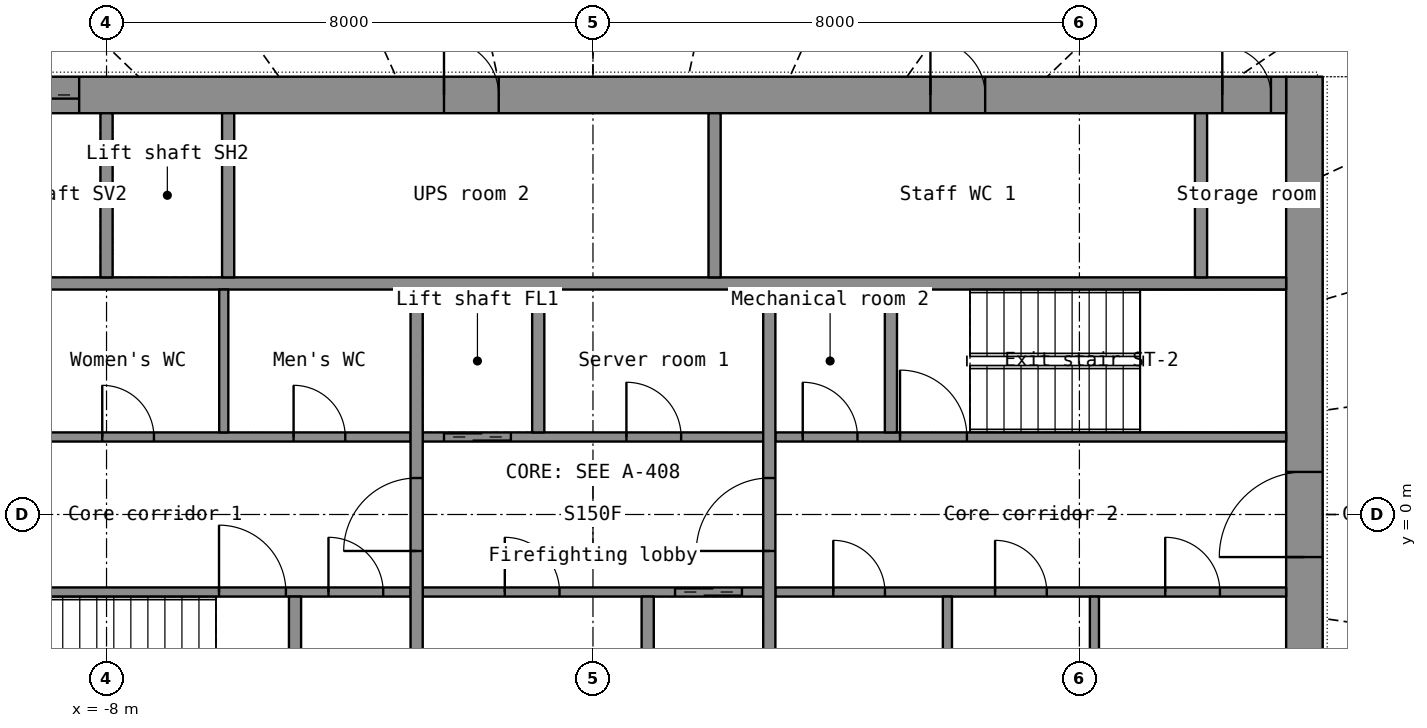
"""IFC4 building model, lengths in metres.
Left out: names, types, materials, properties, quantities, classifications, styles, units other than length and angle.
Written with IfcOpenShell. Run it as: python <this file> out.ifc"""

import sys

from ifc_helpers import new_model, si_unit, direction, frame, frame_2d, origin, place, context, subcontext, project, spatial, rectangle, extrude, element, fill, save


model = new_model("IFC4")
c1 = context("Model", 3, precision=1e-05, world=origin(), true_north=direction((0.0, 1.0)))
c2 = subcontext(c1, "Body", "Model", "MODEL_VIEW")
j1 = project(units=[si_unit("LENGTHUNIT", "METRE"), si_unit("PLANEANGLEUNIT", "RADIAN")], contexts=[c1])
p1 = place(None, origin())
s1 = spatial("IfcSite", under=j1, at=p1, CompositionType="ELEMENT")
p2 = place(p1, origin())
s2 = spatial("IfcBuilding", under=s1, at=p2, CompositionType="ELEMENT")
p3 = place(p2, frame((0.0, 0.0, 44.5)))
s3 = spatial("IfcBuildingStorey", under=s2, at=p3, CompositionType="ELEMENT", Elevation=44.5)
p4 = place(p3, frame((11.7, -7.2, 0.0), z_axis=(0.0, 0.0, 1.0), x_axis=(0.0, 1.0, 0.0)))
e1 = element("IfcWall", 1, at=p4, inside=s3, PredefinedType="SHEAR", context=c2, shape_type="SweptSolid", body=[
    extrude(rectangle(XDim=14.4, YDim=0.6, at=frame_2d((7.2, 0.0))), origin(), (0.0, 0.0, 1.0), 3.3),
])
p5 = place(p4, frame((6.5, 0.0, 0.0)))
e2 = element("IfcOpeningElement", 2, at=p5, cuts=e1, PredefinedType="OPENING", context=c2, shape_type="SweptSolid", body=[
    extrude(rectangle(XDim=1.4, YDim=2.2, at=frame_2d((0.7, 1.1))), frame((0.0, 0.31, 0.0), z_axis=(0.0, -1.0, 0.0), x_axis=(1.0, 0.0, 0.0)), (0.0, 0.0, 1.0), 0.62),
])
p6 = place(p3, frame((-11.4, 6.9, 0.0), z_axis=(0.0, 0.0, 1.0), x_axis=(1.0, 0.0, 0.0)))
e3 = element("IfcWall", 3, at=p6, inside=s3, PredefinedType="SHEAR", context=c2, shape_type="SweptSolid", body=[
    extrude(rectangle(XDim=22.8, YDim=0.6, at=frame_2d((11.4, 0.0))), origin(), (0.0, 0.0, 1.0), 3.3),
])
p7 = place(p6, frame((1.85, 0.0, 0.0)))
e4 = element("IfcOpeningElement", 4, at=p7, cuts=e3, PredefinedType="OPENING", context=c2, shape_type="SweptSolid", body=[
    extrude(rectangle(XDim=1.1, YDim=2.2, at=frame_2d((0.55, 1.1))), frame((0.0, 0.31, 0.0), z_axis=(0.0, -1.0, 0.0), x_axis=(1.0, 0.0, 0.0)), (0.0, 0.0, 1.0), 0.62),
])
p8 = place(p6, frame((8.95, 0.0, 0.0)))
e5 = element("IfcOpeningElement", 5, at=p8, cuts=e3, PredefinedType="OPENING", context=c2, shape_type="SweptSolid", body=[
    extrude(rectangle(XDim=0.9, YDim=2.1, at=frame_2d((0.45, 1.05))), frame((0.0, 0.31, 0.0), z_axis=(0.0, -1.0, 0.0), x_axis=(1.0, 0.0, 0.0)), (0.0, 0.0, 1.0), 0.62),
])
p9 = place(p6, frame((16.95, 0.0, 0.0)))
e6 = element("IfcOpeningElement", 6, at=p9, cuts=e3, PredefinedType="OPENING", context=c2, shape_type="SweptSolid", body=[
    extrude(rectangle(XDim=0.9, YDim=2.1, at=frame_2d((0.45, 1.05))), frame((0.0, 0.31, 0.0), z_axis=(0.0, -1.0, 0.0), x_axis=(1.0, 0.0, 0.0)), (0.0, 0.0, 1.0), 0.62),
])
p10 = place(p6, frame((0.25, 0.0, 0.0)))
e7 = element("IfcOpeningElement", 7, at=p10, cuts=e3, PredefinedType="OPENING", context=c2, shape_type="SweptSolid", body=[
    extrude(rectangle(XDim=0.8, YDim=2.05, at=frame_2d((0.4, 1.025))), frame((0.0, 0.31, 0.0), z_axis=(0.0, -1.0, 0.0), x_axis=(1.0, 0.0, 0.0)), (0.0, 0.0, 1.0), 0.62),
])
p11 = place(p6, frame((21.75, 0.0, 0.0)))
e8 = element("IfcOpeningElement", 8, at=p11, cuts=e3, PredefinedType="OPENING", context=c2, shape_type="SweptSolid", body=[
    extrude(rectangle(XDim=0.8, YDim=2.05, at=frame_2d((0.4, 1.025))), frame((0.0, 0.31, 0.0), z_axis=(0.0, -1.0, 0.0), x_axis=(1.0, 0.0, 0.0)), (0.0, 0.0, 1.0), 0.62),
])
p12 = place(p3, frame((-11.4, 3.8, 0.0), z_axis=(0.0, 0.0, 1.0), x_axis=(1.0, 0.0, 0.0)))
e9 = element("IfcWall", 9, at=p12, inside=s3, PredefinedType="SHEAR", context=c2, shape_type="SweptSolid", body=[
    extrude(rectangle(XDim=22.8, YDim=0.2, at=frame_2d((11.4, 0.0))), origin(), (0.0, 0.0, 1.0), 3.3),
])
for number, where, z_axis, x_axis in (
    (10, (-8.0, 3.9, 0.0), (0.0, 0.0, 1.0), (0.0, 1.0, 0.0)),
    (11, (-6.0, 3.9, 0.0), (0.0, 0.0, 1.0), (0.0, 1.0, 0.0)),
    (12, (10.0, 3.9, 0.0), (0.0, 0.0, 1.0), (0.0, 1.0, 0.0)),
):
    element("IfcWall", number, at=place(p3, frame(where, z_axis=z_axis, x_axis=x_axis)), inside=s3, PredefinedType="SHEAR", context=c2, shape_type="SweptSolid", body=[
        extrude(rectangle(XDim=2.7, YDim=0.2, at=frame_2d((1.35, 0.0))), origin(), (0.0, 0.0, 1.0), 3.3),
    ])
p13 = place(p3, frame((2.0, 3.9, 0.0), z_axis=(0.0, 0.0, 1.0), x_axis=(0.0, 1.0, 0.0)))
e13 = element("IfcWall", 13, at=p13, inside=s3, PredefinedType="PARTITIONING", context=c2, shape_type="SweptSolid", body=[
    extrude(rectangle(XDim=2.7, YDim=0.2, at=frame_2d((1.35, 0.0))), origin(), (0.0, 0.0, 1.0), 3.3),
])
p14 = place(p3, frame((-11.4, -1.275, 0.0), z_axis=(0.0, 0.0, 1.0), x_axis=(1.0, 0.0, 0.0)))
e14 = element("IfcWall", 14, at=p14, inside=s3, PredefinedType="SHEAR", context=c2, shape_type="SweptSolid", body=[
    extrude(rectangle(XDim=8.4, YDim=0.15, at=frame_2d((4.2, 0.0))), origin(), (0.0, 0.0, 1.0), 3.3),
])
p15 = place(p14, frame((5.25, 0.0, 0.0)))
e15 = element("IfcOpeningElement", 15, at=p15, cuts=e14, PredefinedType="OPENING", context=c2, shape_type="SweptSolid", body=[
    extrude(rectangle(XDim=1.1, YDim=2.15, at=frame_2d((0.55, 1.075))), frame((0.0, 0.085, 0.0), z_axis=(0.0, -1.0, 0.0), x_axis=(1.0, 0.0, 0.0)), (0.0, 0.0, 1.0), 0.17),
])
p16 = place(p14, frame((7.05, 0.0, 0.0)))
e16 = element("IfcOpeningElement", 16, at=p16, cuts=e14, PredefinedType="OPENING", context=c2, shape_type="SweptSolid", body=[
    extrude(rectangle(XDim=0.9, YDim=2.1, at=frame_2d((0.45, 1.05))), frame((0.0, 0.085, 0.0), z_axis=(0.0, -1.0, 0.0), x_axis=(1.0, 0.0, 0.0)), (0.0, 0.0, 1.0), 0.17),
])
p17 = place(p3, frame((-2.8, -1.275, 0.0), z_axis=(0.0, 0.0, 1.0), x_axis=(1.0, 0.0, 0.0)))
e17 = element("IfcWall", 17, at=p17, inside=s3, PredefinedType="SHEAR", context=c2, shape_type="SweptSolid", body=[
    extrude(rectangle(XDim=5.6, YDim=0.15, at=frame_2d((2.8, 0.0))), origin(), (0.0, 0.0, 1.0), 3.3),
])
p18 = place(p17, frame((4.15, 0.0, 0.0)))
e18 = element("IfcOpeningElement", 18, at=p18, cuts=e17, PredefinedType="OPENING", context=c2, shape_type="SweptSolid", body=[
    extrude(rectangle(XDim=1.1, YDim=2.2, at=frame_2d((0.55, 1.1))), frame((0.0, 0.085, 0.0), z_axis=(0.0, -1.0, 0.0), x_axis=(1.0, 0.0, 0.0)), (0.0, 0.0, 1.0), 0.17),
])
p19 = place(p17, frame((1.35, 0.0, 0.0)))
e19 = element("IfcOpeningElement", 19, at=p19, cuts=e17, PredefinedType="OPENING", context=c2, shape_type="SweptSolid", body=[
    extrude(rectangle(XDim=0.9, YDim=2.1, at=frame_2d((0.45, 1.05))), frame((0.0, 0.085, 0.0), z_axis=(0.0, -1.0, 0.0), x_axis=(1.0, 0.0, 0.0)), (0.0, 0.0, 1.0), 0.17),
])
p20 = place(p3, frame((3.0, -1.275, 0.0), z_axis=(0.0, 0.0, 1.0), x_axis=(1.0, 0.0, 0.0)))
e20 = element("IfcWall", 20, at=p20, inside=s3, PredefinedType="PARTITIONING", context=c2, shape_type="SweptSolid", body=[
    extrude(rectangle(XDim=8.4, YDim=0.15, at=frame_2d((4.2, 0.0))), origin(), (0.0, 0.0, 1.0), 3.3),
])
p21 = place(p20, frame((0.952, 0.0, 0.0)))
e21 = element("IfcOpeningElement", 21, at=p21, cuts=e20, PredefinedType="OPENING", context=c2, shape_type="SweptSolid", body=[
    extrude(rectangle(XDim=0.85, YDim=2.1, at=frame_2d((0.425, 1.05))), frame((0.0, 0.085, 0.0), z_axis=(0.0, -1.0, 0.0), x_axis=(1.0, 0.0, 0.0)), (0.0, 0.0, 1.0), 0.17),
])
p22 = place(p20, frame((3.613, 0.0, 0.0)))
e22 = element("IfcOpeningElement", 22, at=p22, cuts=e20, PredefinedType="OPENING", context=c2, shape_type="SweptSolid", body=[
    extrude(rectangle(XDim=0.85, YDim=2.1, at=frame_2d((0.425, 1.05))), frame((0.0, 0.085, 0.0), z_axis=(0.0, -1.0, 0.0), x_axis=(1.0, 0.0, 0.0)), (0.0, 0.0, 1.0), 0.17),
])
p23 = place(p20, frame((6.411, 0.0, 0.0)))
e23 = element("IfcOpeningElement", 23, at=p23, cuts=e20, PredefinedType="OPENING", context=c2, shape_type="SweptSolid", body=[
    extrude(rectangle(XDim=0.9, YDim=2.1, at=frame_2d((0.45, 1.05))), frame((0.0, 0.085, 0.0), z_axis=(0.0, -1.0, 0.0), x_axis=(1.0, 0.0, 0.0)), (0.0, 0.0, 1.0), 0.17),
])
p24 = place(p3, frame((-11.4, 1.275, 0.0), z_axis=(0.0, 0.0, 1.0), x_axis=(1.0, 0.0, 0.0)))
e24 = element("IfcWall", 24, at=p24, inside=s3, PredefinedType="PARTITIONING", context=c2, shape_type="SweptSolid", body=[
    extrude(rectangle(XDim=8.4, YDim=0.15, at=frame_2d((4.2, 0.0))), origin(), (0.0, 0.0, 1.0), 3.3),
])
p25 = place(p24, frame((0.603, 0.0, 0.0)))
e25 = element("IfcOpeningElement", 25, at=p25, cuts=e24, PredefinedType="OPENING", context=c2, shape_type="SweptSolid", body=[
    extrude(rectangle(XDim=0.9, YDim=2.1, at=frame_2d((0.45, 1.05))), frame((0.0, 0.085, 0.0), z_axis=(0.0, -1.0, 0.0), x_axis=(1.0, 0.0, 0.0)), (0.0, 0.0, 1.0), 0.17),
])
p26 = place(p24, frame((3.33, 0.0, 0.0)))
e26 = element("IfcOpeningElement", 26, at=p26, cuts=e24, PredefinedType="OPENING", context=c2, shape_type="SweptSolid", body=[
    extrude(rectangle(XDim=0.85, YDim=2.1, at=frame_2d((0.425, 1.05))), frame((0.0, 0.085, 0.0), z_axis=(0.0, -1.0, 0.0), x_axis=(1.0, 0.0, 0.0)), (0.0, 0.0, 1.0), 0.17),
])
p27 = place(p24, frame((6.477, 0.0, 0.0)))
e27 = element("IfcOpeningElement", 27, at=p27, cuts=e24, PredefinedType="OPENING", context=c2, shape_type="SweptSolid", body=[
    extrude(rectangle(XDim=0.85, YDim=2.1, at=frame_2d((0.425, 1.05))), frame((0.0, 0.085, 0.0), z_axis=(0.0, -1.0, 0.0), x_axis=(1.0, 0.0, 0.0)), (0.0, 0.0, 1.0), 0.17),
])
p28 = place(p3, frame((-2.8, 1.275, 0.0), z_axis=(0.0, 0.0, 1.0), x_axis=(1.0, 0.0, 0.0)))
e28 = element("IfcWall", 28, at=p28, inside=s3, PredefinedType="SHEAR", context=c2, shape_type="SweptSolid", body=[
    extrude(rectangle(XDim=5.6, YDim=0.15, at=frame_2d((2.8, 0.0))), origin(), (0.0, 0.0, 1.0), 3.3),
])
p29 = place(p28, frame((0.35, 0.0, 0.0)))
e29 = element("IfcOpeningElement", 29, at=p29, cuts=e28, PredefinedType="OPENING", context=c2, shape_type="SweptSolid", body=[
    extrude(rectangle(XDim=1.1, YDim=2.2, at=frame_2d((0.55, 1.1))), frame((0.0, 0.085, 0.0), z_axis=(0.0, -1.0, 0.0), x_axis=(1.0, 0.0, 0.0)), (0.0, 0.0, 1.0), 0.17),
])
p30 = place(p28, frame((3.35, 0.0, 0.0)))
e30 = element("IfcOpeningElement", 30, at=p30, cuts=e28, PredefinedType="OPENING", context=c2, shape_type="SweptSolid", body=[
    extrude(rectangle(XDim=0.9, YDim=2.1, at=frame_2d((0.45, 1.05))), frame((0.0, 0.085, 0.0), z_axis=(0.0, -1.0, 0.0), x_axis=(1.0, 0.0, 0.0)), (0.0, 0.0, 1.0), 0.17),
])
p31 = place(p3, frame((3.0, 1.275, 0.0), z_axis=(0.0, 0.0, 1.0), x_axis=(1.0, 0.0, 0.0)))
e31 = element("IfcWall", 31, at=p31, inside=s3, PredefinedType="SHEAR", context=c2, shape_type="SweptSolid", body=[
    extrude(rectangle(XDim=8.4, YDim=0.15, at=frame_2d((4.2, 0.0))), origin(), (0.0, 0.0, 1.0), 3.3),
])
p32 = place(p31, frame((2.05, 0.0, 0.0)))
e32 = element("IfcOpeningElement", 32, at=p32, cuts=e31, PredefinedType="OPENING", context=c2, shape_type="SweptSolid", body=[
    extrude(rectangle(XDim=1.1, YDim=2.15, at=frame_2d((0.55, 1.075))), frame((0.0, 0.085, 0.0), z_axis=(0.0, -1.0, 0.0), x_axis=(1.0, 0.0, 0.0)), (0.0, 0.0, 1.0), 0.17),
])
p33 = place(p31, frame((0.45, 0.0, 0.0)))
e33 = element("IfcOpeningElement", 33, at=p33, cuts=e31, PredefinedType="OPENING", context=c2, shape_type="SweptSolid", body=[
    extrude(rectangle(XDim=0.9, YDim=2.1, at=frame_2d((0.45, 1.05))), frame((0.0, 0.085, 0.0), z_axis=(0.0, -1.0, 0.0), x_axis=(1.0, 0.0, 0.0)), (0.0, 0.0, 1.0), 0.17),
])
p34 = place(p3, frame((-2.9, -3.7, 0.0), z_axis=(0.0, 0.0, 1.0), x_axis=(0.0, 1.0, 0.0)))
e34 = element("IfcWall", 34, at=p34, inside=s3, PredefinedType="SHEAR", context=c2, shape_type="SweptSolid", body=[
    extrude(rectangle(XDim=7.4, YDim=0.2, at=frame_2d((3.7, 0.0))), origin(), (0.0, 0.0, 1.0), 3.3),
])
p35 = place(p34, frame((3.1, 0.0, 0.0)))
e35 = element("IfcOpeningElement", 35, at=p35, cuts=e34, PredefinedType="OPENING", context=c2, shape_type="SweptSolid", body=[
    extrude(rectangle(XDim=1.2, YDim=2.2, at=frame_2d((0.6, 1.1))), frame((0.0, 0.11, 0.0), z_axis=(0.0, -1.0, 0.0), x_axis=(1.0, 0.0, 0.0)), (0.0, 0.0, 1.0), 0.22),
])
p36 = place(p3, frame((2.9, -3.7, 0.0), z_axis=(0.0, 0.0, 1.0), x_axis=(0.0, 1.0, 0.0)))
e36 = element("IfcWall", 36, at=p36, inside=s3, PredefinedType="SHEAR", context=c2, shape_type="SweptSolid", body=[
    extrude(rectangle(XDim=7.4, YDim=0.2, at=frame_2d((3.7, 0.0))), origin(), (0.0, 0.0, 1.0), 3.3),
])
p37 = place(p36, frame((3.1, 0.0, 0.0)))
e37 = element("IfcOpeningElement", 37, at=p37, cuts=e36, PredefinedType="OPENING", context=c2, shape_type="SweptSolid", body=[
    extrude(rectangle(XDim=1.2, YDim=2.2, at=frame_2d((0.6, 1.1))), frame((0.0, 0.11, 0.0), z_axis=(0.0, -1.0, 0.0), x_axis=(1.0, 0.0, 0.0)), (0.0, 0.0, 1.0), 0.22),
])
for number, where, z_axis, x_axis in (
    (38, (-0.9, 1.35, 0.0), (0.0, 0.0, 1.0), (0.0, 1.0, 0.0)),
    (39, (0.9, -3.7, 0.0), (0.0, 0.0, 1.0), (0.0, 1.0, 0.0)),
    (40, (-4.9, -3.7, 0.0), (0.0, 0.0, 1.0), (0.0, 1.0, 0.0)),
    (41, (4.9, 1.35, 0.0), (0.0, 0.0, 1.0), (0.0, 1.0, 0.0)),
):
    element("IfcWall", number, at=place(p3, frame(where, z_axis=z_axis, x_axis=x_axis)), inside=s3, PredefinedType="SHEAR", context=c2, shape_type="SweptSolid", body=[
        extrude(rectangle(XDim=2.35, YDim=0.2, at=frame_2d((1.175, 0.0))), origin(), (0.0, 0.0, 1.0), 3.3),
    ])
for number, where, z_axis, x_axis in (
    (42, (-6.072, 1.35, 0.0), (0.0, 0.0, 1.0), (0.0, 1.0, 0.0)),
    (43, (5.829, -3.7, 0.0), (0.0, 0.0, 1.0), (0.0, 1.0, 0.0)),
    (44, (8.247, -3.7, 0.0), (0.0, 0.0, 1.0), (0.0, 1.0, 0.0)),
):
    element("IfcWall", number, at=place(p3, frame(where, z_axis=z_axis, x_axis=x_axis)), inside=s3, PredefinedType="PARTITIONING", context=c2, shape_type="SweptSolid", body=[
        extrude(rectangle(XDim=2.35, YDim=0.15, at=frame_2d((1.175, 0.0))), origin(), (0.0, 0.0, 1.0), 3.3),
    ])
p38 = place(p7, origin())
e45 = element("IfcDoor", 45, at=p38, inside=s3, OperationType="DOUBLE_DOOR_SLIDING", PredefinedType="DOOR", context=c2, shape_type="SweptSolid", body=[
    extrude(rectangle(XDim=1.1, YDim=2.2, at=frame_2d((0.55, 1.1))), frame((0.0, 0.025, 0.0), z_axis=(0.0, -1.0, 0.0), x_axis=(1.0, 0.0, 0.0)), (0.0, 0.0, 1.0), 0.05),
])
fill(e4, e45)
p39 = place(p8, origin())
e46 = element("IfcDoor", 46, at=p39, inside=s3, OperationType="SINGLE_SWING_LEFT", PredefinedType="DOOR", context=c2, shape_type="SweptSolid", body=[
    extrude(rectangle(XDim=0.9, YDim=2.1, at=frame_2d((0.45, 1.05))), frame((0.0, 0.025, 0.0), z_axis=(0.0, -1.0, 0.0), x_axis=(1.0, 0.0, 0.0)), (0.0, 0.0, 1.0), 0.05),
])
fill(e5, e46)
p40 = place(p9, origin())
e47 = element("IfcDoor", 47, at=p40, inside=s3, OperationType="SINGLE_SWING_LEFT", PredefinedType="DOOR", context=c2, shape_type="SweptSolid", body=[
    extrude(rectangle(XDim=0.9, YDim=2.1, at=frame_2d((0.45, 1.05))), frame((0.0, 0.025, 0.0), z_axis=(0.0, -1.0, 0.0), x_axis=(1.0, 0.0, 0.0)), (0.0, 0.0, 1.0), 0.05),
])
fill(e6, e47)
p41 = place(p11, origin())
e48 = element("IfcDoor", 48, at=p41, inside=s3, OperationType="SINGLE_SWING_LEFT", PredefinedType="DOOR", context=c2, shape_type="SweptSolid", body=[
    extrude(rectangle(XDim=0.8, YDim=2.05, at=frame_2d((0.4, 1.025))), frame((0.0, 0.025, 0.0), z_axis=(0.0, -1.0, 0.0), x_axis=(1.0, 0.0, 0.0)), (0.0, 0.0, 1.0), 0.05),
])
fill(e8, e48)
p42 = place(p5, origin())
e49 = element("IfcDoor", 49, at=p42, inside=s3, OperationType="DOUBLE_DOOR_SINGLE_SWING", PredefinedType="DOOR", context=c2, shape_type="SweptSolid", body=[
    extrude(rectangle(XDim=1.4, YDim=2.2, at=frame_2d((0.7, 1.1))), frame((0.0, 0.025, 0.0), z_axis=(0.0, -1.0, 0.0), x_axis=(1.0, 0.0, 0.0)), (0.0, 0.0, 1.0), 0.05),
])
fill(e2, e49)
p43 = place(p35, origin())
e50 = element("IfcDoor", 50, at=p43, inside=s3, OperationType="SINGLE_SWING_LEFT", PredefinedType="DOOR", context=c2, shape_type="SweptSolid", body=[
    extrude(rectangle(XDim=1.2, YDim=2.2, at=frame_2d((0.6, 1.1))), frame((0.0, 0.025, 0.0), z_axis=(0.0, -1.0, 0.0), x_axis=(1.0, 0.0, 0.0)), (0.0, 0.0, 1.0), 0.05),
])
fill(e35, e50)
p44 = place(p37, origin())
e51 = element("IfcDoor", 51, at=p44, inside=s3, OperationType="SINGLE_SWING_LEFT", PredefinedType="DOOR", context=c2, shape_type="SweptSolid", body=[
    extrude(rectangle(XDim=1.2, YDim=2.2, at=frame_2d((0.6, 1.1))), frame((0.0, 0.025, 0.0), z_axis=(0.0, -1.0, 0.0), x_axis=(1.0, 0.0, 0.0)), (0.0, 0.0, 1.0), 0.05),
])
fill(e37, e51)
p45 = place(p29, origin())
e52 = element("IfcDoor", 52, at=p45, inside=s3, OperationType="DOUBLE_DOOR_SLIDING", PredefinedType="DOOR", context=c2, shape_type="SweptSolid", body=[
    extrude(rectangle(XDim=1.1, YDim=2.2, at=frame_2d((0.55, 1.1))), frame((0.0, 0.025, 0.0), z_axis=(0.0, -1.0, 0.0), x_axis=(1.0, 0.0, 0.0)), (0.0, 0.0, 1.0), 0.05),
])
fill(e29, e52)
p46 = place(p18, origin())
e53 = element("IfcDoor", 53, at=p46, inside=s3, OperationType="DOUBLE_DOOR_SLIDING", PredefinedType="DOOR", context=c2, shape_type="SweptSolid", body=[
    extrude(rectangle(XDim=1.1, YDim=2.2, at=frame_2d((0.55, 1.1))), frame((0.0, 0.025, 0.0), z_axis=(0.0, -1.0, 0.0), x_axis=(1.0, 0.0, 0.0)), (0.0, 0.0, 1.0), 0.05),
])
fill(e18, e53)
p47 = place(p15, origin())
e54 = element("IfcDoor", 54, at=p47, inside=s3, OperationType="SINGLE_SWING_LEFT", PredefinedType="DOOR", context=c2, shape_type="SweptSolid", body=[
    extrude(rectangle(XDim=1.1, YDim=2.15, at=frame_2d((0.55, 1.075))), frame((0.0, 0.025, 0.0), z_axis=(0.0, -1.0, 0.0), x_axis=(1.0, 0.0, 0.0)), (0.0, 0.0, 1.0), 0.05),
])
fill(e15, e54)
p48 = place(p32, origin())
e55 = element("IfcDoor", 55, at=p48, inside=s3, OperationType="SINGLE_SWING_LEFT", PredefinedType="DOOR", context=c2, shape_type="SweptSolid", body=[
    extrude(rectangle(XDim=1.1, YDim=2.15, at=frame_2d((0.55, 1.075))), frame((0.0, 0.025, 0.0), z_axis=(0.0, -1.0, 0.0), x_axis=(1.0, 0.0, 0.0)), (0.0, 0.0, 1.0), 0.05),
])
fill(e32, e55)
p49 = place(p26, origin())
e56 = element("IfcDoor", 56, at=p49, inside=s3, OperationType="SINGLE_SWING_LEFT", PredefinedType="DOOR", context=c2, shape_type="SweptSolid", body=[
    extrude(rectangle(XDim=0.85, YDim=2.1, at=frame_2d((0.425, 1.05))), frame((0.0, 0.025, 0.0), z_axis=(0.0, -1.0, 0.0), x_axis=(1.0, 0.0, 0.0)), (0.0, 0.0, 1.0), 0.05),
])
fill(e26, e56)
p50 = place(p27, origin())
e57 = element("IfcDoor", 57, at=p50, inside=s3, OperationType="SINGLE_SWING_LEFT", PredefinedType="DOOR", context=c2, shape_type="SweptSolid", body=[
    extrude(rectangle(XDim=0.85, YDim=2.1, at=frame_2d((0.425, 1.05))), frame((0.0, 0.025, 0.0), z_axis=(0.0, -1.0, 0.0), x_axis=(1.0, 0.0, 0.0)), (0.0, 0.0, 1.0), 0.05),
])
fill(e27, e57)
p51 = place(p21, origin())
e58 = element("IfcDoor", 58, at=p51, inside=s3, OperationType="SINGLE_SWING_LEFT", PredefinedType="DOOR", context=c2, shape_type="SweptSolid", body=[
    extrude(rectangle(XDim=0.85, YDim=2.1, at=frame_2d((0.425, 1.05))), frame((0.0, 0.025, 0.0), z_axis=(0.0, -1.0, 0.0), x_axis=(1.0, 0.0, 0.0)), (0.0, 0.0, 1.0), 0.05),
])
fill(e21, e58)
p52 = place(p22, origin())
e59 = element("IfcDoor", 59, at=p52, inside=s3, OperationType="SINGLE_SWING_LEFT", PredefinedType="DOOR", context=c2, shape_type="SweptSolid", body=[
    extrude(rectangle(XDim=0.85, YDim=2.1, at=frame_2d((0.425, 1.05))), frame((0.0, 0.025, 0.0), z_axis=(0.0, -1.0, 0.0), x_axis=(1.0, 0.0, 0.0)), (0.0, 0.0, 1.0), 0.05),
])
fill(e22, e59)
p53 = place(p23, origin())
e60 = element("IfcDoor", 60, at=p53, inside=s3, OperationType="SINGLE_SWING_LEFT", PredefinedType="DOOR", context=c2, shape_type="SweptSolid", body=[
    extrude(rectangle(XDim=0.9, YDim=2.1, at=frame_2d((0.45, 1.05))), frame((0.0, 0.025, 0.0), z_axis=(0.0, -1.0, 0.0), x_axis=(1.0, 0.0, 0.0)), (0.0, 0.0, 1.0), 0.05),
])
fill(e23, e60)
p54 = place(p30, origin())
e61 = element("IfcDoor", 61, at=p54, inside=s3, OperationType="SINGLE_SWING_LEFT", PredefinedType="DOOR", context=c2, shape_type="SweptSolid", body=[
    extrude(rectangle(XDim=0.9, YDim=2.1, at=frame_2d((0.45, 1.05))), frame((0.0, 0.025, 0.0), z_axis=(0.0, -1.0, 0.0), x_axis=(1.0, 0.0, 0.0)), (0.0, 0.0, 1.0), 0.05),
])
fill(e30, e61)
p55 = place(p19, origin())
e62 = element("IfcDoor", 62, at=p55, inside=s3, OperationType="SINGLE_SWING_LEFT", PredefinedType="DOOR", context=c2, shape_type="SweptSolid", body=[
    extrude(rectangle(XDim=0.9, YDim=2.1, at=frame_2d((0.45, 1.05))), frame((0.0, 0.025, 0.0), z_axis=(0.0, -1.0, 0.0), x_axis=(1.0, 0.0, 0.0)), (0.0, 0.0, 1.0), 0.05),
])
fill(e19, e62)
p56 = place(p33, origin())
e63 = element("IfcDoor", 63, at=p56, inside=s3, OperationType="SINGLE_SWING_LEFT", PredefinedType="DOOR", context=c2, shape_type="SweptSolid", body=[
    extrude(rectangle(XDim=0.9, YDim=2.1, at=frame_2d((0.45, 1.05))), frame((0.0, 0.025, 0.0), z_axis=(0.0, -1.0, 0.0), x_axis=(1.0, 0.0, 0.0)), (0.0, 0.0, 1.0), 0.05),
])
fill(e33, e63)
p57 = place(p16, origin())
e64 = element("IfcDoor", 64, at=p57, inside=s3, OperationType="SINGLE_SWING_LEFT", PredefinedType="DOOR", context=c2, shape_type="SweptSolid", body=[
    extrude(rectangle(XDim=0.9, YDim=2.1, at=frame_2d((0.45, 1.05))), frame((0.0, 0.025, 0.0), z_axis=(0.0, -1.0, 0.0), x_axis=(1.0, 0.0, 0.0)), (0.0, 0.0, 1.0), 0.05),
])
fill(e16, e64)
save(model, sys.argv[1])
